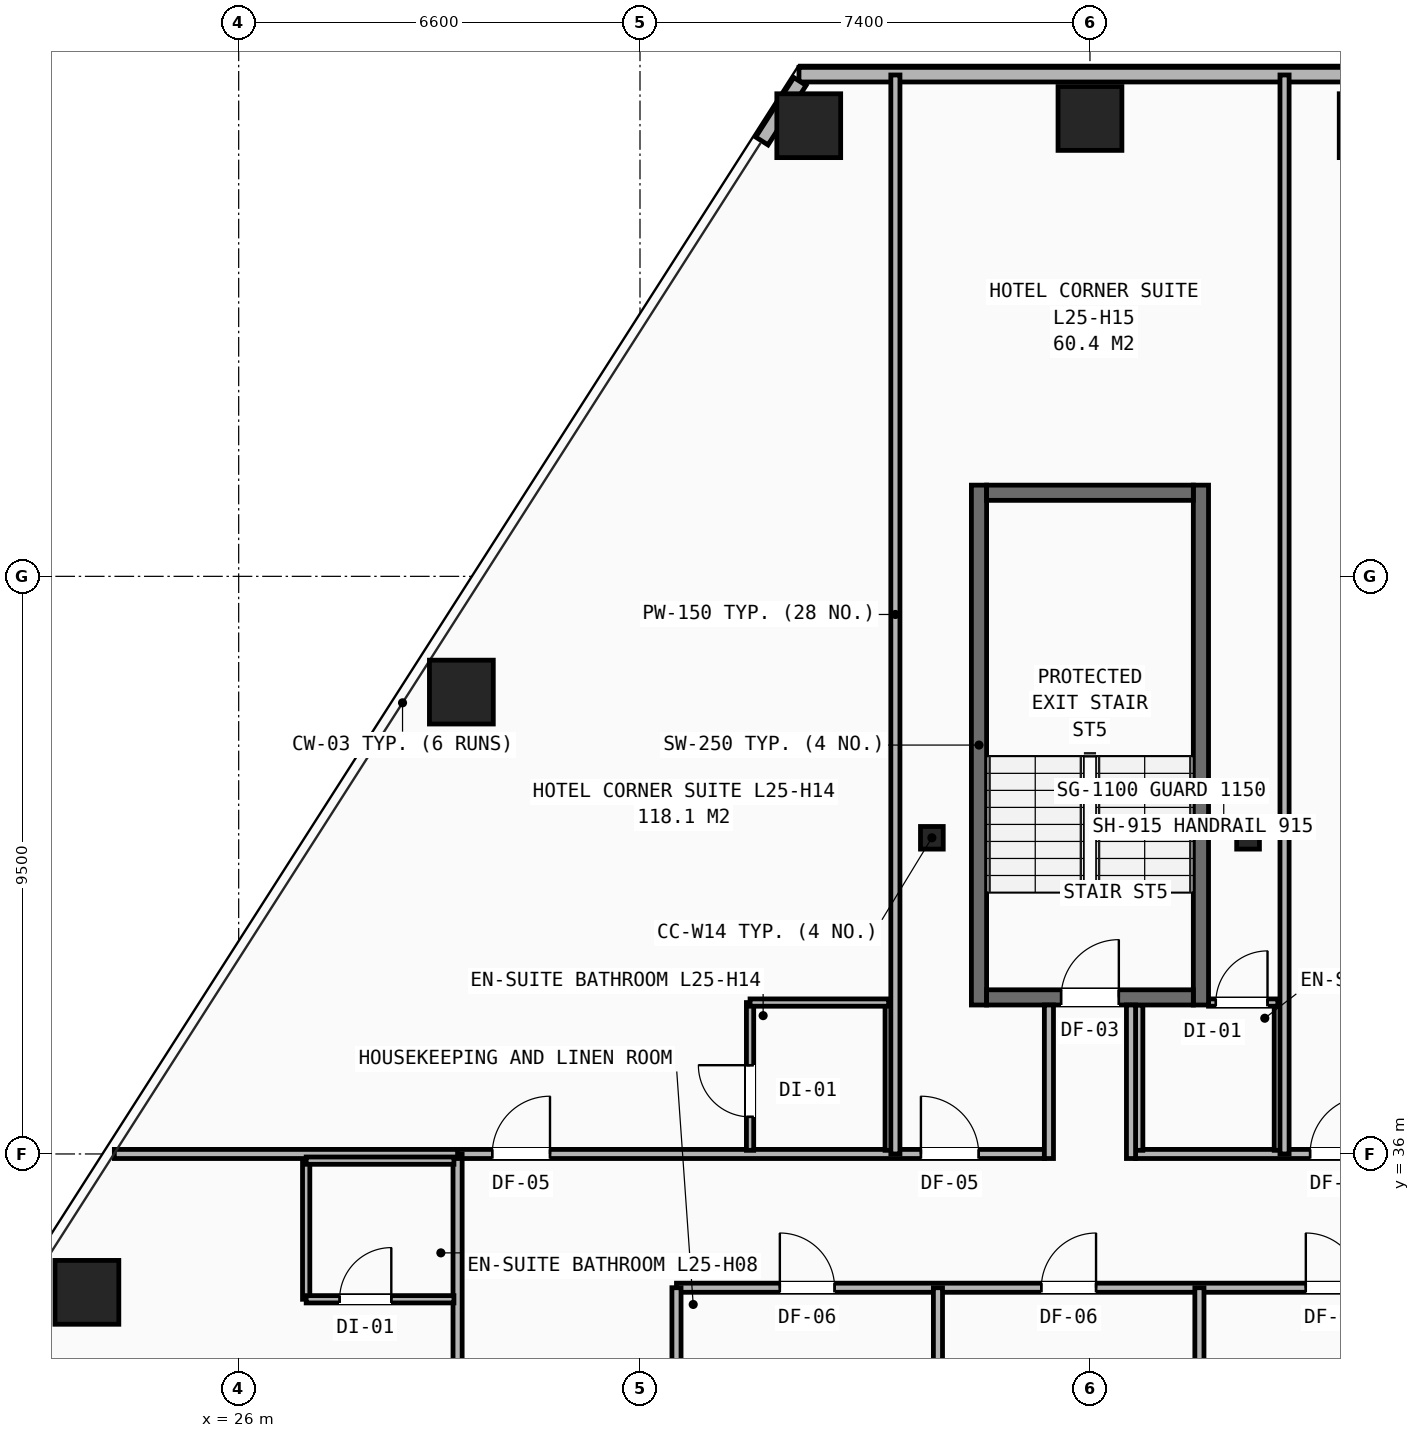
"""IFC4 building model, lengths in metres.
Left out: names, types, materials, properties, quantities, classifications, styles, units other than length and angle.
Written with IfcOpenShell. Run it as: python <this file> out.ifc"""

import sys

from ifc_helpers import new_model, si_unit, direction, frame, frame_2d, origin, origin_2d, place, context, subcontext, project, spatial, rectangle, hollow_rectangle, i_section, extrude, element, fill, save


model = new_model("IFC4")
c1 = context("Model", 3, precision=1e-05, world=origin(), true_north=direction((0.0, 1.0)))
c2 = subcontext(c1, "Body", "Model", "MODEL_VIEW")
j1 = project(units=[si_unit("LENGTHUNIT", "METRE"), si_unit("PLANEANGLEUNIT", "RADIAN")], contexts=[c1])
p1 = place(None, origin())
s1 = spatial("IfcSite", under=j1, at=p1, CompositionType="ELEMENT")
p2 = place(p1, origin())
s2 = spatial("IfcBuilding", under=s1, at=p2, CompositionType="ELEMENT")
p3 = place(p2, frame((0.0, 0.0, 89.4)))
s3 = spatial("IfcBuildingStorey", under=s2, at=p3, CompositionType="ELEMENT", Elevation=89.4)
for number, where, z_axis, x_axis in (
    (1, (37.4, 41.2, 0.0), (0.0, 0.0, 1.0), (1.0, 0.0, 0.0)),
    (2, (42.6, 41.2, 0.0), (0.0, 0.0, 1.0), (1.0, 0.0, 0.0)),
):
    element("IfcColumn", number, at=place(p3, frame(where, z_axis=z_axis, x_axis=x_axis)), inside=s3, PredefinedType="COLUMN", context=c2, shape_type="SweptSolid", body=[
        extrude(i_section(OverallWidth=0.374, OverallDepth=0.372, WebThickness=0.016, FlangeThickness=0.026, at=origin_2d()), origin(), (0.0, 0.0, 1.0), 3.2),
    ])
for number, where, z_axis, x_axis in (
    (3, (44.625, 52.912, 0.0), (0.0, 0.0, 1.0), (1.0, 0.0, 0.0)),
    (4, (40.0, 53.031, 0.0), (0.0, 0.0, 1.0), (1.0, 0.0, 0.0)),
    (5, (35.375, 52.912, 0.0), (0.0, 0.0, 1.0), (1.0, 0.0, 0.0)),
    (6, (29.662, 43.596, 0.0), (0.0, 0.0, 1.0), (1.0, 0.0, 0.0)),
    (7, (23.504, 33.724, 0.0), (0.0, 0.0, 1.0), (1.0, 0.0, 0.0)),
):
    element("IfcColumn", number, at=place(p3, frame(where, z_axis=z_axis, x_axis=x_axis)), inside=s3, PredefinedType="COLUMN", context=c2, shape_type="SweptSolid", body=[
        extrude(hollow_rectangle(XDim=1.05, YDim=1.05, WallThickness=0.07, at=origin_2d()), origin(), (0.0, 0.0, 1.0), 3.2),
    ])
p4 = place(p3, frame((35.214, 53.751, 0.0), z_axis=(0.0, 0.0, 1.0), x_axis=(1.0, 0.0, 0.0)))
e8 = element("IfcWall", 8, at=p4, inside=s3, PredefinedType="SHEAR", context=c2, shape_type="SweptSolid", body=[
    extrude(rectangle(XDim=9.571, YDim=0.24, at=frame_2d((4.786, 0.0))), origin(), (0.0, 0.0, 1.0), 2.253),
])
p5 = place(p3, frame((35.231, 53.639, 0.0), z_axis=(0.0, 0.0, 1.0), x_axis=(-0.538898738592, -0.842370553583, 0.0)))
e9 = element("IfcWall", 9, at=p5, inside=s3, PredefinedType="SHEAR", context=c2, shape_type="SweptSolid", body=[
    extrude(rectangle(XDim=1.163, YDim=0.24, at=frame_2d((0.581, 0.0))), origin(), (0.0, 0.0, 1.0), 2.253),
])
p6 = place(p3, frame((33.2, 33.8, 0.0), z_axis=(0.0, 0.0, 1.0), x_axis=(1.0, 0.0, 0.0)))
e10 = element("IfcWall", 10, at=p6, inside=s3, PredefinedType="PARTITIONING", context=c2, shape_type="SweptSolid", body=[
    extrude(rectangle(XDim=13.0, YDim=0.15, at=frame_2d((6.5, 0.0))), origin(), (0.0, 0.0, 1.0), 2.97),
])
p7 = place(p6, frame((1.7, 0.0, 0.0)))
e11 = element("IfcOpeningElement", 11, at=p7, cuts=e10, PredefinedType="OPENING", context=c2, shape_type="SweptSolid", body=[
    extrude(rectangle(XDim=0.9, YDim=2.1, at=frame_2d((0.45, 1.05))), frame((0.0, 0.085, 0.0), z_axis=(0.0, -1.0, 0.0), x_axis=(1.0, 0.0, 0.0)), (0.0, 0.0, 1.0), 0.17),
])
p8 = place(p6, frame((6.0, 0.0, 0.0)))
e12 = element("IfcOpeningElement", 12, at=p8, cuts=e10, PredefinedType="OPENING", context=c2, shape_type="SweptSolid", body=[
    extrude(rectangle(XDim=0.9, YDim=2.1, at=frame_2d((0.45, 1.05))), frame((0.0, 0.085, 0.0), z_axis=(0.0, -1.0, 0.0), x_axis=(1.0, 0.0, 0.0)), (0.0, 0.0, 1.0), 0.17),
])
p9 = place(p6, frame((10.35, 0.0, 0.0)))
e13 = element("IfcOpeningElement", 13, at=p9, cuts=e10, PredefinedType="OPENING", context=c2, shape_type="SweptSolid", body=[
    extrude(rectangle(XDim=0.9, YDim=2.1, at=frame_2d((0.45, 1.05))), frame((0.0, 0.085, 0.0), z_axis=(0.0, -1.0, 0.0), x_axis=(1.0, 0.0, 0.0)), (0.0, 0.0, 1.0), 0.17),
])
for number, where, z_axis, x_axis in (
    (14, (33.2, 31.2, 0.0), (0.0, 0.0, 1.0), (0.0, 1.0, 0.0)),
    (15, (37.5, 31.2, 0.0), (0.0, 0.0, 1.0), (0.0, 1.0, 0.0)),
    (16, (41.8, 31.2, 0.0), (0.0, 0.0, 1.0), (0.0, 1.0, 0.0)),
):
    element("IfcWall", number, at=place(p3, frame(where, z_axis=z_axis, x_axis=x_axis)), inside=s3, PredefinedType="PARTITIONING", context=c2, shape_type="SweptSolid", body=[
        extrude(rectangle(XDim=2.6, YDim=0.15, at=frame_2d((1.3, 0.0))), origin(), (0.0, 0.0, 1.0), 2.698),
    ])
p10 = place(p3, frame((29.6, 36.0, 0.0), z_axis=(0.0, 0.0, 1.0), x_axis=(1.0, 0.0, 0.0)))
e17 = element("IfcWall", 17, at=p10, inside=s3, PredefinedType="PARTITIONING", context=c2, shape_type="SweptSolid", body=[
    extrude(rectangle(XDim=9.65, YDim=0.15, at=frame_2d((4.825, 0.0))), origin(), (0.0, 0.0, 1.0), 2.503),
])
p11 = place(p10, frame((0.57, 0.0, 0.0)))
e18 = element("IfcOpeningElement", 18, at=p11, cuts=e17, PredefinedType="OPENING", context=c2, shape_type="SweptSolid", body=[
    extrude(rectangle(XDim=0.95, YDim=2.1, at=frame_2d((0.475, 1.05))), frame((0.0, 0.085, 0.0), z_axis=(0.0, -1.0, 0.0), x_axis=(1.0, 0.0, 0.0)), (0.0, 0.0, 1.0), 0.17),
])
p12 = place(p10, frame((7.62, 0.0, 0.0)))
e19 = element("IfcOpeningElement", 19, at=p12, cuts=e17, PredefinedType="OPENING", context=c2, shape_type="SweptSolid", body=[
    extrude(rectangle(XDim=0.95, YDim=2.1, at=frame_2d((0.475, 1.05))), frame((0.0, 0.085, 0.0), z_axis=(0.0, -1.0, 0.0), x_axis=(1.0, 0.0, 0.0)), (0.0, 0.0, 1.0), 0.17),
])
p13 = place(p3, frame((40.75, 36.0, 0.0), z_axis=(0.0, 0.0, 1.0), x_axis=(1.0, 0.0, 0.0)))
e20 = element("IfcWall", 20, at=p13, inside=s3, PredefinedType="PARTITIONING", context=c2, shape_type="SweptSolid", body=[
    extrude(rectangle(XDim=9.65, YDim=0.15, at=frame_2d((4.825, 0.0))), origin(), (0.0, 0.0, 1.0), 2.503),
])
p14 = place(p13, frame((2.87, 0.0, 0.0)))
e21 = element("IfcOpeningElement", 21, at=p14, cuts=e20, PredefinedType="OPENING", context=c2, shape_type="SweptSolid", body=[
    extrude(rectangle(XDim=0.95, YDim=2.1, at=frame_2d((0.475, 1.05))), frame((0.0, 0.085, 0.0), z_axis=(0.0, -1.0, 0.0), x_axis=(1.0, 0.0, 0.0)), (0.0, 0.0, 1.0), 0.17),
])
p15 = place(p3, frame((29.6, 14.1, 0.0), z_axis=(0.0, 0.0, 1.0), x_axis=(0.0, 1.0, 0.0)))
e22 = element("IfcWall", 22, at=p15, inside=s3, PredefinedType="PARTITIONING", context=c2, shape_type="SweptSolid", body=[
    extrude(rectangle(XDim=21.9, YDim=0.15, at=frame_2d((10.95, 0.0))), origin(), (0.0, 0.0, 1.0), 2.181),
])
p16 = place(p15, frame((0.42, 0.0, 0.0)))
e23 = element("IfcOpeningElement", 23, at=p16, cuts=e22, PredefinedType="OPENING", context=c2, shape_type="SweptSolid", body=[
    extrude(rectangle(XDim=0.95, YDim=2.1, at=frame_2d((0.475, 1.05))), frame((0.0, 0.085, 0.0), z_axis=(0.0, -1.0, 0.0), x_axis=(1.0, 0.0, 0.0)), (0.0, 0.0, 1.0), 0.17),
])
p17 = place(p15, frame((5.52, 0.0, 0.0)))
e24 = element("IfcOpeningElement", 24, at=p17, cuts=e22, PredefinedType="OPENING", context=c2, shape_type="SweptSolid", body=[
    extrude(rectangle(XDim=0.95, YDim=2.1, at=frame_2d((0.475, 1.05))), frame((0.0, 0.085, 0.0), z_axis=(0.0, -1.0, 0.0), x_axis=(1.0, 0.0, 0.0)), (0.0, 0.0, 1.0), 0.17),
])
p18 = place(p15, frame((10.92, 0.0, 0.0)))
e25 = element("IfcOpeningElement", 25, at=p18, cuts=e22, PredefinedType="OPENING", context=c2, shape_type="SweptSolid", body=[
    extrude(rectangle(XDim=0.95, YDim=2.1, at=frame_2d((0.475, 1.05))), frame((0.0, 0.085, 0.0), z_axis=(0.0, -1.0, 0.0), x_axis=(1.0, 0.0, 0.0)), (0.0, 0.0, 1.0), 0.17),
])
p19 = place(p15, frame((16.52, 0.0, 0.0)))
e26 = element("IfcOpeningElement", 26, at=p19, cuts=e22, PredefinedType="OPENING", context=c2, shape_type="SweptSolid", body=[
    extrude(rectangle(XDim=0.95, YDim=2.1, at=frame_2d((0.475, 1.05))), frame((0.0, 0.085, 0.0), z_axis=(0.0, -1.0, 0.0), x_axis=(1.0, 0.0, 0.0)), (0.0, 0.0, 1.0), 0.17),
])
p20 = place(p3, frame((23.955, 36.0, 0.0), z_axis=(0.0, 0.0, 1.0), x_axis=(1.0, 0.0, 0.0)))
e27 = element("IfcWall", 27, at=p20, inside=s3, PredefinedType="PARTITIONING", context=c2, shape_type="SweptSolid", body=[
    extrude(rectangle(XDim=5.645, YDim=0.15, at=frame_2d((2.823, 0.0))), origin(), (0.0, 0.0, 1.0), 2.258),
])
p21 = place(p3, frame((27.11, 33.61, 0.0), z_axis=(0.0, 0.0, 1.0), x_axis=(0.0, 1.0, 0.0)))
e28 = element("IfcWall", 28, at=p21, inside=s3, PredefinedType="PARTITIONING", context=c2, shape_type="SweptSolid", body=[
    extrude(rectangle(XDim=2.28, YDim=0.12, at=frame_2d((1.14, 0.0))), origin(), (0.0, 0.0, 1.0), 2.97),
])
p22 = place(p3, frame((27.11, 33.61, 0.0), z_axis=(0.0, 0.0, 1.0), x_axis=(1.0, 0.0, 0.0)))
e29 = element("IfcWall", 29, at=p22, inside=s3, PredefinedType="PARTITIONING", context=c2, shape_type="SweptSolid", body=[
    extrude(rectangle(XDim=2.43, YDim=0.12, at=frame_2d((1.215, 0.0))), origin(), (0.0, 0.0, 1.0), 2.503),
])
p23 = place(p22, frame((0.55, 0.0, 0.0)))
e30 = element("IfcOpeningElement", 30, at=p23, cuts=e29, PredefinedType="OPENING", context=c2, shape_type="SweptSolid", body=[
    extrude(rectangle(XDim=0.85, YDim=2.05, at=frame_2d((0.425, 1.025))), frame((0.0, 0.07, 0.0), z_axis=(0.0, -1.0, 0.0), x_axis=(1.0, 0.0, 0.0)), (0.0, 0.0, 1.0), 0.14),
])
p24 = place(p3, frame((27.11, 35.89, 0.0), z_axis=(0.0, 0.0, 1.0), x_axis=(1.0, 0.0, 0.0)))
e31 = element("IfcWall", 31, at=p24, inside=s3, PredefinedType="PARTITIONING", context=c2, shape_type="SweptSolid", body=[
    extrude(rectangle(XDim=2.43, YDim=0.12, at=frame_2d((1.215, 0.0))), origin(), (0.0, 0.0, 1.0), 2.503),
])
p25 = place(p3, frame((34.41, 36.06, 0.0), z_axis=(0.0, 0.0, 1.0), x_axis=(0.0, 1.0, 0.0)))
e32 = element("IfcWall", 32, at=p25, inside=s3, PredefinedType="PARTITIONING", context=c2, shape_type="SweptSolid", body=[
    extrude(rectangle(XDim=2.43, YDim=0.12, at=frame_2d((1.215, 0.0))), origin(), (0.0, 0.0, 1.0), 2.97),
])
p26 = place(p25, frame((0.55, 0.0, 0.0)))
e33 = element("IfcOpeningElement", 33, at=p26, cuts=e32, PredefinedType="OPENING", context=c2, shape_type="SweptSolid", body=[
    extrude(rectangle(XDim=0.85, YDim=2.05, at=frame_2d((0.425, 1.025))), frame((0.0, 0.07, 0.0), z_axis=(0.0, -1.0, 0.0), x_axis=(1.0, 0.0, 0.0)), (0.0, 0.0, 1.0), 0.14),
])
p27 = place(p3, frame((36.69, 36.06, 0.0), z_axis=(0.0, 0.0, 1.0), x_axis=(0.0, 1.0, 0.0)))
e34 = element("IfcWall", 34, at=p27, inside=s3, PredefinedType="PARTITIONING", context=c2, shape_type="SweptSolid", body=[
    extrude(rectangle(XDim=2.43, YDim=0.12, at=frame_2d((1.215, 0.0))), origin(), (0.0, 0.0, 1.0), 2.97),
])
p28 = place(p3, frame((34.41, 38.49, 0.0), z_axis=(0.0, 0.0, 1.0), x_axis=(1.0, 0.0, 0.0)))
e35 = element("IfcWall", 35, at=p28, inside=s3, PredefinedType="PARTITIONING", context=c2, shape_type="SweptSolid", body=[
    extrude(rectangle(XDim=2.28, YDim=0.12, at=frame_2d((1.14, 0.0))), origin(), (0.0, 0.0, 1.0), 2.97),
])
p29 = place(p3, frame((36.8, 36.0, 0.0), z_axis=(0.0, 0.0, 1.0), x_axis=(0.0, 1.0, 0.0)))
e36 = element("IfcWall", 36, at=p29, inside=s3, PredefinedType="PARTITIONING", context=c2, shape_type="SweptSolid", body=[
    extrude(rectangle(XDim=17.746, YDim=0.15, at=frame_2d((8.873, 0.0))), origin(), (0.0, 0.0, 1.0), 2.181),
])
p30 = place(p3, frame((40.81, 36.06, 0.0), z_axis=(0.0, 0.0, 1.0), x_axis=(0.0, 1.0, 0.0)))
e37 = element("IfcWall", 37, at=p30, inside=s3, PredefinedType="PARTITIONING", context=c2, shape_type="SweptSolid", body=[
    extrude(rectangle(XDim=2.39, YDim=0.12, at=frame_2d((1.195, 0.0))), origin(), (0.0, 0.0, 1.0), 2.97),
])
p31 = place(p3, frame((43.09, 36.06, 0.0), z_axis=(0.0, 0.0, 1.0), x_axis=(0.0, 1.0, 0.0)))
e38 = element("IfcWall", 38, at=p31, inside=s3, PredefinedType="PARTITIONING", context=c2, shape_type="SweptSolid", body=[
    extrude(rectangle(XDim=2.43, YDim=0.12, at=frame_2d((1.215, 0.0))), origin(), (0.0, 0.0, 1.0), 2.97),
])
p32 = place(p3, frame((41.95, 38.49, 0.0), z_axis=(0.0, 0.0, 1.0), x_axis=(1.0, 0.0, 0.0)))
e39 = element("IfcWall", 39, at=p32, inside=s3, PredefinedType="PARTITIONING", context=c2, shape_type="SweptSolid", body=[
    extrude(rectangle(XDim=1.14, YDim=0.12, at=frame_2d((0.57, 0.0))), origin(), (0.0, 0.0, 1.0), 2.97),
])
p33 = place(p32, frame((0.12, 0.0, 0.0)))
e40 = element("IfcOpeningElement", 40, at=p33, cuts=e39, PredefinedType="OPENING", context=c2, shape_type="SweptSolid", body=[
    extrude(rectangle(XDim=0.85, YDim=2.05, at=frame_2d((0.425, 1.025))), frame((0.0, 0.07, 0.0), z_axis=(0.0, -1.0, 0.0), x_axis=(1.0, 0.0, 0.0)), (0.0, 0.0, 1.0), 0.14),
])
p34 = place(p3, frame((43.2, 36.0, 0.0), z_axis=(0.0, 0.0, 1.0), x_axis=(0.0, 1.0, 0.0)))
e41 = element("IfcWall", 41, at=p34, inside=s3, PredefinedType="PARTITIONING", context=c2, shape_type="SweptSolid", body=[
    extrude(rectangle(XDim=17.746, YDim=0.15, at=frame_2d((8.873, 0.0))), origin(), (0.0, 0.0, 1.0), 2.181),
])
for number, where, z_axis, x_axis in (
    (42, (38.175, 38.45, 0.0), (0.0, 0.0, 1.0), (0.0, 1.0, 0.0)),
    (43, (41.825, 38.45, 0.0), (0.0, 0.0, 1.0), (0.0, 1.0, 0.0)),
):
    element("IfcWall", number, at=place(p3, frame(where, z_axis=z_axis, x_axis=x_axis)), inside=s3, PredefinedType="SHEAR", context=c2, shape_type="SweptSolid", body=[
        extrude(rectangle(XDim=8.55, YDim=0.25, at=frame_2d((4.275, 0.0))), origin(), (0.0, 0.0, 1.0), 2.97),
    ])
p35 = place(p3, frame((38.3, 38.575, 0.0), z_axis=(0.0, 0.0, 1.0), x_axis=(1.0, 0.0, 0.0)))
e44 = element("IfcWall", 44, at=p35, inside=s3, PredefinedType="SHEAR", context=c2, shape_type="SweptSolid", body=[
    extrude(rectangle(XDim=3.4, YDim=0.25, at=frame_2d((1.7, 0.0))), origin(), (0.0, 0.0, 1.0), 2.97),
])
p36 = place(p35, frame((1.225, 0.0, 0.0)))
e45 = element("IfcOpeningElement", 45, at=p36, cuts=e44, PredefinedType="OPENING", context=c2, shape_type="SweptSolid", body=[
    extrude(rectangle(XDim=0.95, YDim=2.1, at=frame_2d((0.475, 1.05))), frame((0.0, 0.135, 0.0), z_axis=(0.0, -1.0, 0.0), x_axis=(1.0, 0.0, 0.0)), (0.0, 0.0, 1.0), 0.27),
])
p37 = place(p3, frame((38.3, 46.875, 0.0), z_axis=(0.0, 0.0, 1.0), x_axis=(1.0, 0.0, 0.0)))
e46 = element("IfcWall", 46, at=p37, inside=s3, PredefinedType="SHEAR", context=c2, shape_type="SweptSolid", body=[
    extrude(rectangle(XDim=3.4, YDim=0.25, at=frame_2d((1.7, 0.0))), origin(), (0.0, 0.0, 1.0), 2.97),
])
for number, where, z_axis, x_axis in (
    (47, (39.325, 35.925, 0.0), (0.0, 0.0, 1.0), (0.0, 1.0, 0.0)),
    (48, (40.675, 35.925, 0.0), (0.0, 0.0, 1.0), (0.0, 1.0, 0.0)),
):
    element("IfcWall", number, at=place(p3, frame(where, z_axis=z_axis, x_axis=x_axis)), inside=s3, PredefinedType="PARTITIONING", context=c2, shape_type="SweptSolid", body=[
        extrude(rectangle(XDim=2.525, YDim=0.15, at=frame_2d((1.262, 0.0))), origin(), (0.0, 0.0, 1.0), 2.97),
    ])
p38 = place(p7, origin())
e49 = element("IfcDoor", 49, at=p38, inside=s3, OperationType="SINGLE_SWING_LEFT", PredefinedType="DOOR", context=c2, shape_type="SweptSolid", body=[
    extrude(rectangle(XDim=0.9, YDim=2.1, at=frame_2d((0.45, 1.05))), frame((0.0, 0.025, 0.0), z_axis=(0.0, -1.0, 0.0), x_axis=(1.0, 0.0, 0.0)), (0.0, 0.0, 1.0), 0.05),
])
fill(e11, e49)
p39 = place(p8, origin())
e50 = element("IfcDoor", 50, at=p39, inside=s3, OperationType="SINGLE_SWING_RIGHT", PredefinedType="DOOR", context=c2, shape_type="SweptSolid", body=[
    extrude(rectangle(XDim=0.9, YDim=2.1, at=frame_2d((0.45, 1.05))), frame((0.0, 0.025, 0.0), z_axis=(0.0, -1.0, 0.0), x_axis=(1.0, 0.0, 0.0)), (0.0, 0.0, 1.0), 0.05),
])
fill(e12, e50)
p40 = place(p9, origin())
e51 = element("IfcDoor", 51, at=p40, inside=s3, OperationType="SINGLE_SWING_LEFT", PredefinedType="DOOR", context=c2, shape_type="SweptSolid", body=[
    extrude(rectangle(XDim=0.9, YDim=2.1, at=frame_2d((0.45, 1.05))), frame((0.0, 0.025, 0.0), z_axis=(0.0, -1.0, 0.0), x_axis=(1.0, 0.0, 0.0)), (0.0, 0.0, 1.0), 0.05),
])
fill(e13, e51)
p41 = place(p23, origin())
e52 = element("IfcDoor", 52, at=p41, inside=s3, OperationType="SINGLE_SWING_RIGHT", PredefinedType="DOOR", context=c2, shape_type="SweptSolid", body=[
    extrude(rectangle(XDim=0.85, YDim=2.05, at=frame_2d((0.425, 1.025))), frame((0.0, 0.025, 0.0), z_axis=(0.0, -1.0, 0.0), x_axis=(1.0, 0.0, 0.0)), (0.0, 0.0, 1.0), 0.05),
])
fill(e30, e52)
p42 = place(p11, origin())
e53 = element("IfcDoor", 53, at=p42, inside=s3, OperationType="SINGLE_SWING_RIGHT", PredefinedType="DOOR", context=c2, shape_type="SweptSolid", body=[
    extrude(rectangle(XDim=0.95, YDim=2.1, at=frame_2d((0.475, 1.05))), frame((0.0, 0.025, 0.0), z_axis=(0.0, -1.0, 0.0), x_axis=(1.0, 0.0, 0.0)), (0.0, 0.0, 1.0), 0.05),
])
fill(e18, e53)
p43 = place(p26, origin())
e54 = element("IfcDoor", 54, at=p43, inside=s3, OperationType="SINGLE_SWING_RIGHT", PredefinedType="DOOR", context=c2, shape_type="SweptSolid", body=[
    extrude(rectangle(XDim=0.85, YDim=2.05, at=frame_2d((0.425, 1.025))), frame((0.0, 0.025, 0.0), z_axis=(0.0, -1.0, 0.0), x_axis=(1.0, 0.0, 0.0)), (0.0, 0.0, 1.0), 0.05),
])
fill(e33, e54)
p44 = place(p12, origin())
e55 = element("IfcDoor", 55, at=p44, inside=s3, OperationType="SINGLE_SWING_LEFT", PredefinedType="DOOR", context=c2, shape_type="SweptSolid", body=[
    extrude(rectangle(XDim=0.95, YDim=2.1, at=frame_2d((0.475, 1.05))), frame((0.0, 0.025, 0.0), z_axis=(0.0, -1.0, 0.0), x_axis=(1.0, 0.0, 0.0)), (0.0, 0.0, 1.0), 0.05),
])
fill(e19, e55)
p45 = place(p33, origin())
e56 = element("IfcDoor", 56, at=p45, inside=s3, OperationType="SINGLE_SWING_RIGHT", PredefinedType="DOOR", context=c2, shape_type="SweptSolid", body=[
    extrude(rectangle(XDim=0.85, YDim=2.05, at=frame_2d((0.425, 1.025))), frame((0.0, 0.025, 0.0), z_axis=(0.0, -1.0, 0.0), x_axis=(1.0, 0.0, 0.0)), (0.0, 0.0, 1.0), 0.05),
])
fill(e40, e56)
p46 = place(p14, origin())
e57 = element("IfcDoor", 57, at=p46, inside=s3, OperationType="SINGLE_SWING_RIGHT", PredefinedType="DOOR", context=c2, shape_type="SweptSolid", body=[
    extrude(rectangle(XDim=0.95, YDim=2.1, at=frame_2d((0.475, 1.05))), frame((0.0, 0.025, 0.0), z_axis=(0.0, -1.0, 0.0), x_axis=(1.0, 0.0, 0.0)), (0.0, 0.0, 1.0), 0.05),
])
fill(e21, e57)
p47 = place(p36, origin())
e58 = element("IfcDoor", 58, at=p47, inside=s3, OperationType="SINGLE_SWING_RIGHT", PredefinedType="DOOR", context=c2, shape_type="SweptSolid", body=[
    extrude(rectangle(XDim=0.95, YDim=2.1, at=frame_2d((0.475, 1.05))), frame((0.0, 0.025, 0.0), z_axis=(0.0, -1.0, 0.0), x_axis=(1.0, 0.0, 0.0)), (0.0, 0.0, 1.0), 0.05),
])
fill(e45, e58)
save(model, sys.argv[1])
